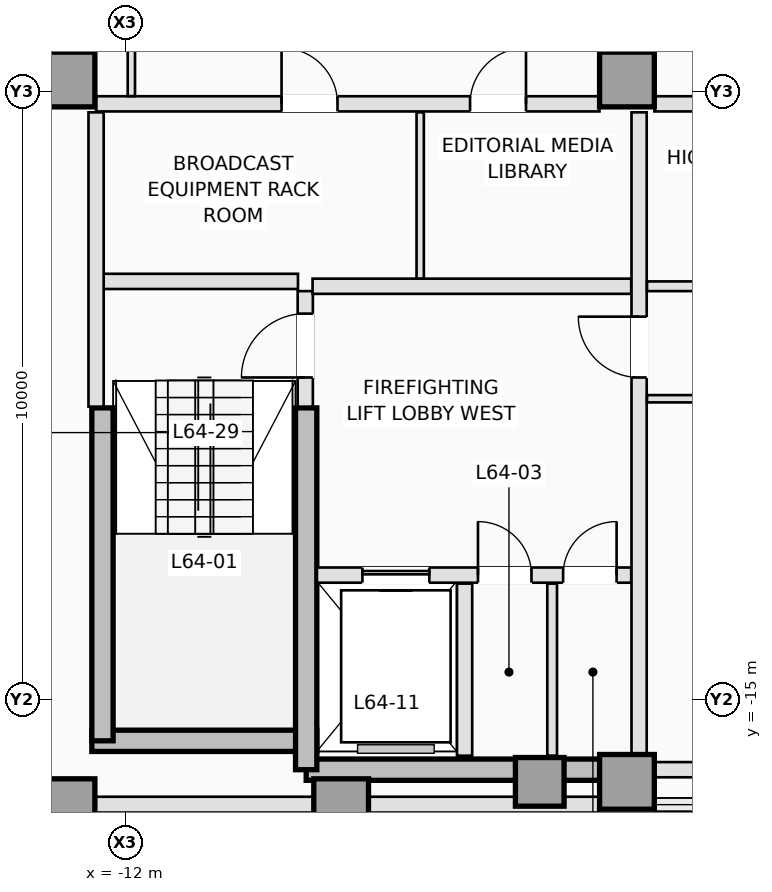
"""IFC4 building model, lengths in metres.
Left out: names, types, materials, properties, quantities, classifications, styles, units other than length and angle.
Written with IfcOpenShell. Run it as: python <this file> out.ifc"""

import sys

from ifc_helpers import new_model, si_unit, direction, frame, frame_2d, origin, origin_2d, place, context, subcontext, project, spatial, rectangle, extrude, element, fill, save


model = new_model("IFC4")
c1 = context("Model", 3, precision=1e-05, world=origin(), true_north=direction((0.0, 1.0)))
c2 = subcontext(c1, "Body", "Model", "MODEL_VIEW")
j1 = project(units=[si_unit("LENGTHUNIT", "METRE"), si_unit("PLANEANGLEUNIT", "RADIAN")], contexts=[c1])
p1 = place(None, origin())
s1 = spatial("IfcSite", under=j1, at=p1, CompositionType="ELEMENT")
p2 = place(p1, origin())
s2 = spatial("IfcBuilding", under=s1, at=p2, CompositionType="ELEMENT")
p3 = place(p2, frame((0.0, 0.0, 232.4)))
s3 = spatial("IfcBuildingStorey", under=s2, at=p3, CompositionType="ELEMENT", Elevation=232.4)
p4 = place(p3, frame((-12.55, -15.675, 0.0), z_axis=(0.0, 0.0, 1.0), x_axis=(1.0, 0.0, 0.0)))
e1 = element("IfcWall", 1, at=p4, inside=s3, PredefinedType="SHEAR", context=c2, shape_type="SweptSolid", body=[
    extrude(rectangle(XDim=3.7, YDim=0.35, at=frame_2d((1.85, 0.0))), origin(), (0.0, 0.0, 1.0), 3.5),
])
p5 = place(p3, frame((-9.025, -16.15, 0.0), z_axis=(0.0, 0.0, 1.0), x_axis=(1.0, 0.0, 0.0)))
e2 = element("IfcWall", 2, at=p5, inside=s3, PredefinedType="SHEAR", context=c2, shape_type="SweptSolid", body=[
    extrude(rectangle(XDim=5.275, YDim=0.35, at=frame_2d((2.637, 0.0))), origin(), (0.0, 0.0, 1.0), 3.5),
])
p6 = place(p3, frame((-12.375, -15.675, 0.0), z_axis=(0.0, 0.0, 1.0), x_axis=(0.0, 1.0, 0.0)))
e3 = element("IfcWall", 3, at=p6, inside=s3, PredefinedType="SHEAR", context=c2, shape_type="SweptSolid", body=[
    extrude(rectangle(XDim=5.475, YDim=0.35, at=frame_2d((2.738, 0.0))), origin(), (0.0, 0.0, 1.0), 3.5),
])
p7 = place(p3, frame((-9.025, -16.15, 0.0), z_axis=(0.0, 0.0, 1.0), x_axis=(0.0, 1.0, 0.0)))
e4 = element("IfcWall", 4, at=p7, inside=s3, PredefinedType="SHEAR", context=c2, shape_type="SweptSolid", body=[
    extrude(rectangle(XDim=5.95, YDim=0.35, at=frame_2d((2.975, 0.0))), origin(), (0.0, 0.0, 1.0), 3.5),
])
for number, where, z_axis, x_axis in (
    (5, (-12.95, -16.75, 0.0), (0.0, 0.0, 1.0), (1.0, 0.0, 0.0)),
    (6, (-8.45, -16.75, 0.0), (0.0, 0.0, 1.0), (1.0, 0.0, 0.0)),
    (7, (-3.75, -16.35, 0.0), (0.0, 0.0, 1.0), (1.0, 0.0, 0.0)),
    (8, (-12.95, -4.8, 0.0), (0.0, 0.0, 1.0), (1.0, 0.0, 0.0)),
    (9, (-3.75, -4.8, 0.0), (0.0, 0.0, 1.0), (1.0, 0.0, 0.0)),
):
    element("IfcColumn", number, at=place(p3, frame(where, z_axis=z_axis, x_axis=x_axis)), inside=s3, PredefinedType="COLUMN", context=c2, shape_type="SweptSolid", body=[
        extrude(rectangle(XDim=0.9, YDim=0.9, at=origin_2d()), origin(), (0.0, 0.0, 1.0), 3.5),
    ])
p8 = place(p3, frame((-5.184, -16.35, 0.0), z_axis=(0.0, 0.0, 1.0), x_axis=(0.0, 1.0, 0.0)))
e10 = element("IfcColumn", 10, at=p8, inside=s3, PredefinedType="COLUMN", context=c2, shape_type="SweptSolid", body=[
    extrude(rectangle(XDim=0.8, YDim=0.8, at=origin_2d()), origin(), (0.0, 0.0, 1.0), 3.5),
])
p9 = place(p3, frame((-4.22, -16.725, 0.0), z_axis=(0.0, 0.0, 1.0), x_axis=(-1.0, 0.0, 0.0)))
e11 = element("IfcWall", 11, at=p9, inside=s3, PredefinedType="STANDARD", context=c2, shape_type="SweptSolid", body=[
    extrude(rectangle(XDim=11.273, YDim=0.26, at=frame_2d((5.636, 0.0))), origin(), (0.0, 0.0, 1.0), 2.79),
])
p10 = place(p3, frame((-9.04, -10.18, 0.0), z_axis=(0.0, 0.0, 1.0), x_axis=(0.0, 1.0, 0.0)))
e12 = element("IfcWall", 12, at=p10, inside=s3, PredefinedType="PARTITIONING", context=c2, shape_type="SweptSolid", body=[
    extrude(rectangle(XDim=1.9, YDim=0.25, at=frame_2d((0.95, 0.0))), origin(), (0.0, 0.0, 1.0), 3.25),
])
p11 = place(p10, frame((0.48, 0.0, 0.0)))
e13 = element("IfcOpeningElement", 13, at=p11, cuts=e12, PredefinedType="OPENING", context=c2, shape_type="SweptSolid", body=[
    extrude(rectangle(XDim=1.05, YDim=2.15, at=frame_2d((0.525, 1.075))), frame((0.0, 0.135, 0.0), z_axis=(0.0, -1.0, 0.0), x_axis=(1.0, 0.0, 0.0)), (0.0, 0.0, 1.0), 0.27),
])
p12 = place(p3, frame((-12.38, -8.12, 0.0), z_axis=(0.0, 0.0, 1.0), x_axis=(1.0, 0.0, 0.0)))
e14 = element("IfcWall", 14, at=p12, inside=s3, PredefinedType="PARTITIONING", context=c2, shape_type="SweptSolid", body=[
    extrude(rectangle(XDim=3.22, YDim=0.25, at=frame_2d((1.61, 0.0))), origin(), (0.0, 0.0, 1.0), 3.25),
])
p13 = place(p3, frame((-12.48, -10.18, 0.0), z_axis=(0.0, 0.0, 1.0), x_axis=(0.0, 1.0, 0.0)))
e15 = element("IfcWall", 15, at=p13, inside=s3, PredefinedType="PARTITIONING", context=c2, shape_type="SweptSolid", body=[
    extrude(rectangle(XDim=4.84, YDim=0.25, at=frame_2d((2.42, 0.0))), origin(), (0.0, 0.0, 1.0), 3.25),
])
p14 = place(p3, frame((-8.848, -12.95, 0.0), z_axis=(0.0, 0.0, 1.0), x_axis=(1.0, 0.0, 0.0)))
e16 = element("IfcWall", 16, at=p14, inside=s3, PredefinedType="PARTITIONING", context=c2, shape_type="SweptSolid", body=[
    extrude(rectangle(XDim=5.168, YDim=0.25, at=frame_2d((2.584, 0.0))), origin(), (0.0, 0.0, 1.0), 3.25),
])
p15 = place(p14, frame((0.748, 0.0, 0.0)))
e17 = element("IfcOpeningElement", 17, at=p15, cuts=e16, PredefinedType="OPENING", context=c2, shape_type="SweptSolid", body=[
    extrude(rectangle(XDim=1.1, YDim=2.15, at=frame_2d((0.55, 1.075))), frame((0.0, 0.135, 0.0), z_axis=(0.0, -1.0, 0.0), x_axis=(1.0, 0.0, 0.0)), (0.0, 0.0, 1.0), 0.27),
])
p16 = place(p14, frame((2.648, 0.0, 0.0)))
e18 = element("IfcOpeningElement", 18, at=p16, cuts=e16, PredefinedType="OPENING", context=c2, shape_type="SweptSolid", body=[
    extrude(rectangle(XDim=0.88, YDim=2.1, at=frame_2d((0.44, 1.05))), frame((0.0, 0.135, 0.0), z_axis=(0.0, -1.0, 0.0), x_axis=(1.0, 0.0, 0.0)), (0.0, 0.0, 1.0), 0.27),
])
p17 = place(p14, frame((4.048, 0.0, 0.0)))
e19 = element("IfcOpeningElement", 19, at=p17, cuts=e16, PredefinedType="OPENING", context=c2, shape_type="SweptSolid", body=[
    extrude(rectangle(XDim=0.88, YDim=2.1, at=frame_2d((0.44, 1.05))), frame((0.0, 0.135, 0.0), z_axis=(0.0, -1.0, 0.0), x_axis=(1.0, 0.0, 0.0)), (0.0, 0.0, 1.0), 0.27),
])
p18 = place(p3, frame((-6.42, -15.92, 0.0), z_axis=(0.0, 0.0, 1.0), x_axis=(0.0, 1.0, 0.0)))
e20 = element("IfcWall", 20, at=p18, inside=s3, PredefinedType="PARTITIONING", context=c2, shape_type="SweptSolid", body=[
    extrude(rectangle(XDim=2.83, YDim=0.25, at=frame_2d((1.415, 0.0))), origin(), (0.0, 0.0, 1.0), 3.25),
])
p19 = place(p3, frame((-4.98, -15.92, 0.0), z_axis=(0.0, 0.0, 1.0), x_axis=(0.0, 1.0, 0.0)))
e21 = element("IfcWall", 21, at=p19, inside=s3, PredefinedType="PARTITIONING", context=c2, shape_type="SweptSolid", body=[
    extrude(rectangle(XDim=2.83, YDim=0.16, at=frame_2d((1.415, 0.0))), origin(), (0.0, 0.0, 1.0), 3.25),
])
p20 = place(p3, frame((-8.92, -8.2, 0.0), z_axis=(0.0, 0.0, 1.0), x_axis=(1.0, 0.0, 0.0)))
e22 = element("IfcWall", 22, at=p20, inside=s3, PredefinedType="PARTITIONING", context=c2, shape_type="SweptSolid", body=[
    extrude(rectangle(XDim=5.24, YDim=0.25, at=frame_2d((2.62, 0.0))), origin(), (0.0, 0.0, 1.0), 3.25),
])
p21 = place(p3, frame((-3.55, -15.898, 0.0), z_axis=(0.0, 0.0, 1.0), x_axis=(0.0, 1.0, 0.0)))
e23 = element("IfcWall", 23, at=p21, inside=s3, PredefinedType="PARTITIONING", context=c2, shape_type="SweptSolid", body=[
    extrude(rectangle(XDim=10.558, YDim=0.25, at=frame_2d((5.279, 0.0))), origin(), (0.0, 0.0, 1.0), 3.25),
])
p22 = place(p21, frame((6.198, 0.0, 0.0)))
e24 = element("IfcOpeningElement", 24, at=p22, cuts=e23, PredefinedType="OPENING", context=c2, shape_type="SweptSolid", body=[
    extrude(rectangle(XDim=1.0, YDim=2.15, at=frame_2d((0.5, 1.075))), frame((0.0, 0.135, 0.0), z_axis=(0.0, -1.0, 0.0), x_axis=(1.0, 0.0, 0.0)), (0.0, 0.0, 1.0), 0.27),
])
p23 = place(p3, frame((-12.48, -5.2, 0.0), z_axis=(0.0, 0.0, 1.0), x_axis=(1.0, 0.0, 0.0)))
e25 = element("IfcWall", 25, at=p23, inside=s3, PredefinedType="PARTITIONING", context=c2, shape_type="SweptSolid", body=[
    extrude(rectangle(XDim=8.278, YDim=0.25, at=frame_2d((4.139, 0.0))), origin(), (0.0, 0.0, 1.0), 3.25),
])
p24 = place(p23, frame((3.05, 0.0, 0.0)))
e26 = element("IfcOpeningElement", 26, at=p24, cuts=e25, PredefinedType="OPENING", context=c2, shape_type="SweptSolid", body=[
    extrude(rectangle(XDim=0.92, YDim=2.12, at=frame_2d((0.46, 1.06))), frame((0.0, 0.135, 0.0), z_axis=(0.0, -1.0, 0.0), x_axis=(1.0, 0.0, 0.0)), (0.0, 0.0, 1.0), 0.27),
])
p25 = place(p23, frame((6.15, 0.0, 0.0)))
e27 = element("IfcOpeningElement", 27, at=p25, cuts=e25, PredefinedType="OPENING", context=c2, shape_type="SweptSolid", body=[
    extrude(rectangle(XDim=0.92, YDim=2.12, at=frame_2d((0.46, 1.06))), frame((0.0, 0.135, 0.0), z_axis=(0.0, -1.0, 0.0), x_axis=(1.0, 0.0, 0.0)), (0.0, 0.0, 1.0), 0.27),
])
p26 = place(p3, frame((-3.298, -5.2, 0.0), z_axis=(0.0, 0.0, 1.0), x_axis=(1.0, 0.0, 0.0)))
e28 = element("IfcWall", 28, at=p26, inside=s3, PredefinedType="PARTITIONING", context=c2, shape_type="SweptSolid", body=[
    extrude(rectangle(XDim=2.348, YDim=0.25, at=frame_2d((1.174, 0.0))), origin(), (0.0, 0.0, 1.0), 3.25),
])
p27 = place(p3, frame((-7.15, -8.073, 0.0), z_axis=(0.0, 0.0, 1.0), x_axis=(0.0, 1.0, 0.0)))
e29 = element("IfcWall", 29, at=p27, inside=s3, PredefinedType="PARTITIONING", context=c2, shape_type="SweptSolid", body=[
    extrude(rectangle(XDim=2.733, YDim=0.12, at=frame_2d((1.366, 0.0))), origin(), (0.0, 0.0, 1.0), 3.25),
])
p28 = place(p3, frame((-3.298, -16.15, 0.0), z_axis=(0.0, 0.0, 1.0), x_axis=(1.0, 0.0, 0.0)))
e30 = element("IfcWall", 30, at=p28, inside=s3, PredefinedType="PARTITIONING", context=c2, shape_type="SweptSolid", body=[
    extrude(rectangle(XDim=6.596, YDim=0.25, at=frame_2d((3.298, 0.0))), origin(), (0.0, 0.0, 1.0), 2.844),
])
p29 = place(p3, frame((-3.42, -8.2, 0.0), z_axis=(0.0, 0.0, 1.0), x_axis=(1.0, 0.0, 0.0)))
e31 = element("IfcWall", 31, at=p29, inside=s3, PredefinedType="PARTITIONING", context=c2, shape_type="SweptSolid", body=[
    extrude(rectangle(XDim=6.84, YDim=0.16, at=frame_2d((3.42, 0.0))), origin(), (0.0, 0.0, 1.0), 3.25),
])
p30 = place(p29, frame((2.92, 0.0, 0.0)))
e32 = element("IfcOpeningElement", 32, at=p30, cuts=e31, PredefinedType="OPENING", context=c2, shape_type="SweptSolid", body=[
    extrude(rectangle(XDim=1.0, YDim=2.15, at=frame_2d((0.5, 1.075))), frame((0.0, 0.09, 0.0), z_axis=(0.0, -1.0, 0.0), x_axis=(1.0, 0.0, 0.0)), (0.0, 0.0, 1.0), 0.18),
])
p31 = place(p3, frame((-3.42, -10.05, 0.0), z_axis=(0.0, 0.0, 1.0), x_axis=(1.0, 0.0, 0.0)))
e33 = element("IfcWall", 33, at=p31, inside=s3, PredefinedType="PARTITIONING", context=c2, shape_type="SweptSolid", body=[
    extrude(rectangle(XDim=6.84, YDim=0.12, at=frame_2d((3.42, 0.0))), origin(), (0.0, 0.0, 1.0), 3.25),
])
p32 = place(p31, frame((2.95, 0.0, 0.0)))
e34 = element("IfcOpeningElement", 34, at=p32, cuts=e33, PredefinedType="OPENING", context=c2, shape_type="SweptSolid", body=[
    extrude(rectangle(XDim=0.92, YDim=2.12, at=frame_2d((0.46, 1.06))), frame((0.0, 0.07, 0.0), z_axis=(0.0, -1.0, 0.0), x_axis=(1.0, 0.0, 0.0)), (0.0, 0.0, 1.0), 0.14),
])
p33 = place(p3, frame((-11.9, -5.073, 0.0), z_axis=(0.0, 0.0, 1.0), x_axis=(0.0, 1.0, 0.0)))
e35 = element("IfcWall", 35, at=p33, inside=s3, PredefinedType="PARTITIONING", context=c2, shape_type="SweptSolid", body=[
    extrude(rectangle(XDim=2.343, YDim=0.12, at=frame_2d((1.171, 0.0))), origin(), (0.0, 0.0, 1.0), 3.25),
])
p34 = place(p15, origin())
e36 = element("IfcDoor", 36, at=p34, inside=s3, OperationType="SLIDING_TO_LEFT", PredefinedType="DOOR", context=c2, shape_type="SweptSolid", body=[
    extrude(rectangle(XDim=1.1, YDim=2.15, at=frame_2d((0.55, 1.075))), frame((0.0, 0.025, 0.0), z_axis=(0.0, -1.0, 0.0), x_axis=(1.0, 0.0, 0.0)), (0.0, 0.0, 1.0), 0.05),
])
fill(e17, e36)
p35 = place(p11, origin())
e37 = element("IfcDoor", 37, at=p35, inside=s3, OperationType="SINGLE_SWING_LEFT", PredefinedType="DOOR", context=c2, shape_type="SweptSolid", body=[
    extrude(rectangle(XDim=1.05, YDim=2.15, at=frame_2d((0.525, 1.075))), frame((0.0, 0.025, 0.0), z_axis=(0.0, -1.0, 0.0), x_axis=(1.0, 0.0, 0.0)), (0.0, 0.0, 1.0), 0.05),
])
fill(e13, e37)
p36 = place(p16, origin())
e38 = element("IfcDoor", 38, at=p36, inside=s3, OperationType="SINGLE_SWING_LEFT", PredefinedType="TRAPDOOR", context=c2, shape_type="SweptSolid", body=[
    extrude(rectangle(XDim=0.88, YDim=2.1, at=frame_2d((0.44, 1.05))), frame((0.0, 0.025, 0.0), z_axis=(0.0, -1.0, 0.0), x_axis=(1.0, 0.0, 0.0)), (0.0, 0.0, 1.0), 0.05),
])
fill(e18, e38)
p37 = place(p17, origin())
e39 = element("IfcDoor", 39, at=p37, inside=s3, OperationType="SINGLE_SWING_RIGHT", PredefinedType="TRAPDOOR", context=c2, shape_type="SweptSolid", body=[
    extrude(rectangle(XDim=0.88, YDim=2.1, at=frame_2d((0.44, 1.05))), frame((0.0, 0.025, 0.0), z_axis=(0.0, -1.0, 0.0), x_axis=(1.0, 0.0, 0.0)), (0.0, 0.0, 1.0), 0.05),
])
fill(e19, e39)
p38 = place(p22, origin())
e40 = element("IfcDoor", 40, at=p38, inside=s3, OperationType="SINGLE_SWING_RIGHT", PredefinedType="DOOR", context=c2, shape_type="SweptSolid", body=[
    extrude(rectangle(XDim=1.0, YDim=2.15, at=frame_2d((0.5, 1.075))), frame((0.0, 0.025, 0.0), z_axis=(0.0, -1.0, 0.0), x_axis=(1.0, 0.0, 0.0)), (0.0, 0.0, 1.0), 0.05),
])
fill(e24, e40)
p39 = place(p24, origin())
e41 = element("IfcDoor", 41, at=p39, inside=s3, OperationType="SINGLE_SWING_LEFT", PredefinedType="DOOR", context=c2, shape_type="SweptSolid", body=[
    extrude(rectangle(XDim=0.92, YDim=2.12, at=frame_2d((0.46, 1.06))), frame((0.0, 0.025, 0.0), z_axis=(0.0, -1.0, 0.0), x_axis=(1.0, 0.0, 0.0)), (0.0, 0.0, 1.0), 0.05),
])
fill(e26, e41)
p40 = place(p25, origin())
e42 = element("IfcDoor", 42, at=p40, inside=s3, OperationType="SINGLE_SWING_RIGHT", PredefinedType="DOOR", context=c2, shape_type="SweptSolid", body=[
    extrude(rectangle(XDim=0.92, YDim=2.12, at=frame_2d((0.46, 1.06))), frame((0.0, 0.025, 0.0), z_axis=(0.0, -1.0, 0.0), x_axis=(1.0, 0.0, 0.0)), (0.0, 0.0, 1.0), 0.05),
])
fill(e27, e42)
save(model, sys.argv[1])
